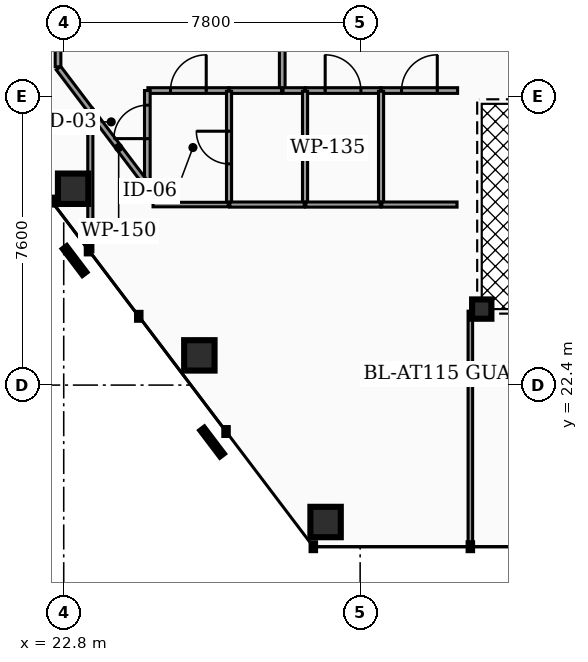
"""IFC4 building model, lengths in metres.
Left out: names, types, materials, properties, quantities, classifications, styles, units other than length and angle.
Written with IfcOpenShell. Run it as: python <this file> out.ifc"""

import sys

from ifc_helpers import new_model, si_unit, direction, frame, frame_2d, origin, origin_2d, place, context, subcontext, project, spatial, rectangle, hollow_rectangle, hollow_circle, extrude, element, fill, save


model = new_model("IFC4")
c1 = context("Model", 3, precision=1e-05, world=origin(), true_north=direction((0.0, 1.0)))
c2 = subcontext(c1, "Body", "Model", "MODEL_VIEW")
j1 = project(units=[si_unit("LENGTHUNIT", "METRE"), si_unit("PLANEANGLEUNIT", "RADIAN")], contexts=[c1])
p1 = place(None, origin())
s1 = spatial("IfcSite", under=j1, at=p1, CompositionType="ELEMENT")
p2 = place(p1, origin())
s2 = spatial("IfcBuilding", under=s1, at=p2, CompositionType="ELEMENT")
p3 = place(p2, frame((0.0, 0.0, 119.0)))
s3 = spatial("IfcBuildingStorey", under=s2, at=p3, CompositionType="ELEMENT", Elevation=119.0)
p4 = place(p3, frame((23.048, 27.566, 0.0), z_axis=(0.017338888501, 0.02545372184, 0.999525622978), x_axis=(-0.826467889679, 0.56298386063, 0.0)))
e1 = element("IfcColumn", 1, at=p4, inside=s3, PredefinedType="COLUMN", context=c2, shape_type="SweptSolid", body=[
    extrude(hollow_rectangle(XDim=0.8, YDim=0.8, WallThickness=0.04, at=origin_2d()), origin(), (0.0, 0.0, 1.0), 4.182),
])
p5 = place(p3, frame((26.369, 23.182, 0.0), z_axis=(0.03432339393, 0.003035402184, 0.999406169164), x_axis=(-0.088091571088, 0.99611238076, 0.0)))
e2 = element("IfcColumn", 2, at=p5, inside=s3, PredefinedType="COLUMN", context=c2, shape_type="SweptSolid", body=[
    extrude(hollow_rectangle(XDim=0.8, YDim=0.8, WallThickness=0.04, at=origin_2d()), origin(), (0.0, 0.0, 1.0), 4.182),
])
p6 = place(p3, frame((29.691, 18.797, 0.0), z_axis=(0.051205208625, -0.01930401373, 0.998501568183), x_axis=(0.352758005187, 0.935714587776, 0.0)))
e3 = element("IfcColumn", 3, at=p6, inside=s3, PredefinedType="COLUMN", context=c2, shape_type="SweptSolid", body=[
    extrude(hollow_rectangle(XDim=0.8, YDim=0.8, WallThickness=0.04, at=origin_2d()), origin(), (0.0, 0.0, 1.0), 4.186),
])
p7 = place(p3, frame((33.8, 24.4, 0.0), z_axis=(0.0, 0.0, 1.0), x_axis=(1.0, 0.0, 0.0)))
e4 = element("IfcColumn", 4, at=p7, inside=s3, PredefinedType="COLUMN", context=c2, shape_type="SweptSolid", body=[
    extrude(hollow_circle(Radius=0.254, WallThickness=0.02, at=origin_2d()), origin(), (0.0, 0.0, 1.0), 4.18),
])
p8 = place(p3, frame((28.55, 30.17, 0.0), z_axis=(0.0, 0.0, 1.0), x_axis=(0.0, 1.0, 0.0)))
e5 = element("IfcWall", 5, at=p8, inside=s3, PredefinedType="PARTITIONING", context=c2, shape_type="SweptSolid", body=[
    extrude(rectangle(XDim=3.065, YDim=0.15, at=frame_2d((1.533, 0.0))), origin(), (0.0, 0.0, 1.0), 3.137),
])
p9 = place(p8, frame((1.062, 0.0, 0.0)))
e6 = element("IfcOpeningElement", 6, at=p9, cuts=e5, PredefinedType="OPENING", context=c2, shape_type="SweptSolid", body=[
    extrude(rectangle(XDim=0.94, YDim=2.05, at=frame_2d((0.47, 1.025))), frame((0.0, 0.085, 0.0), z_axis=(0.0, -1.0, 0.0), x_axis=(1.0, 0.0, 0.0)), (0.0, 0.0, 1.0), 0.17),
])
p10 = place(p3, frame((28.57, 30.15, 0.0), z_axis=(0.0, 0.0, 1.0), x_axis=(1.0, 0.0, 0.0)))
e7 = element("IfcWall", 7, at=p10, inside=s3, PredefinedType="PARTITIONING", context=c2, shape_type="SweptSolid", body=[
    extrude(rectangle(XDim=0.575, YDim=0.15, at=frame_2d((0.288, 0.0))), origin(), (0.0, 0.0, 1.0), 3.137),
])
p11 = place(p3, frame((29.155, 30.15, 0.0), z_axis=(0.0, 0.0, 1.0), x_axis=(1.0, 0.0, 0.0)))
e8 = element("IfcWall", 8, at=p11, inside=s3, PredefinedType="PARTITIONING", context=c2, shape_type="SweptSolid", body=[
    extrude(rectangle(XDim=1.99, YDim=0.15, at=frame_2d((0.995, 0.0))), origin(), (0.0, 0.0, 1.0), 3.137),
])
p12 = place(p11, frame((0.525, 0.0, 0.0)))
e9 = element("IfcOpeningElement", 9, at=p12, cuts=e8, PredefinedType="OPENING", context=c2, shape_type="SweptSolid", body=[
    extrude(rectangle(XDim=0.94, YDim=2.05, at=frame_2d((0.47, 1.025))), frame((0.0, 0.085, 0.0), z_axis=(0.0, -1.0, 0.0), x_axis=(1.0, 0.0, 0.0)), (0.0, 0.0, 1.0), 0.17),
])
p13 = place(p3, frame((31.155, 30.15, 0.0), z_axis=(0.0, 0.0, 1.0), x_axis=(1.0, 0.0, 0.0)))
e10 = element("IfcWall", 10, at=p13, inside=s3, PredefinedType="PARTITIONING", context=c2, shape_type="SweptSolid", body=[
    extrude(rectangle(XDim=2.01, YDim=0.15, at=frame_2d((1.005, 0.0))), origin(), (0.0, 0.0, 1.0), 3.137),
])
p14 = place(p13, frame((0.535, 0.0, 0.0)))
e11 = element("IfcOpeningElement", 11, at=p14, cuts=e10, PredefinedType="OPENING", context=c2, shape_type="SweptSolid", body=[
    extrude(rectangle(XDim=0.94, YDim=2.05, at=frame_2d((0.47, 1.025))), frame((0.0, 0.085, 0.0), z_axis=(0.0, -1.0, 0.0), x_axis=(1.0, 0.0, 0.0)), (0.0, 0.0, 1.0), 0.17),
])
p15 = place(p3, frame((25.015, 30.15, 0.0), z_axis=(0.0, 0.0, 1.0), x_axis=(1.0, 0.0, 0.0)))
e12 = element("IfcWall", 12, at=p15, inside=s3, PredefinedType="PARTITIONING", context=c2, shape_type="SweptSolid", body=[
    extrude(rectangle(XDim=2.13, YDim=0.15, at=frame_2d((1.065, 0.0))), origin(), (0.0, 0.0, 1.0), 3.137),
])
p16 = place(p15, frame((0.595, 0.0, 0.0)))
e13 = element("IfcOpeningElement", 13, at=p16, cuts=e12, PredefinedType="OPENING", context=c2, shape_type="SweptSolid", body=[
    extrude(rectangle(XDim=0.94, YDim=2.05, at=frame_2d((0.47, 1.025))), frame((0.0, 0.085, 0.0), z_axis=(0.0, -1.0, 0.0), x_axis=(1.0, 0.0, 0.0)), (0.0, 0.0, 1.0), 0.17),
])
p17 = place(p3, frame((27.155, 30.15, 0.0), z_axis=(0.0, 0.0, 1.0), x_axis=(1.0, 0.0, 0.0)))
e14 = element("IfcWall", 14, at=p17, inside=s3, PredefinedType="PARTITIONING", context=c2, shape_type="SweptSolid", body=[
    extrude(rectangle(XDim=1.375, YDim=0.15, at=frame_2d((0.688, 0.0))), origin(), (0.0, 0.0, 1.0), 3.137),
])
p18 = place(p3, frame((25.0, 27.675, 0.0), z_axis=(0.0, 0.0, 1.0), x_axis=(0.0, 1.0, 0.0)))
e15 = element("IfcWall", 15, at=p18, inside=s3, PredefinedType="PARTITIONING", context=c2, shape_type="SweptSolid", body=[
    extrude(rectangle(XDim=2.475, YDim=0.15, at=frame_2d((1.237, 0.0))), origin(), (0.0, 0.0, 1.0), 3.137),
])
p19 = place(p18, frame((1.21, 0.0, 0.0)))
e16 = element("IfcOpeningElement", 16, at=p19, cuts=e15, PredefinedType="OPENING", context=c2, shape_type="SweptSolid", body=[
    extrude(rectangle(XDim=0.88, YDim=2.05, at=frame_2d((0.44, 1.025))), frame((0.0, 0.085, 0.0), z_axis=(0.0, -1.0, 0.0), x_axis=(1.0, 0.0, 0.0)), (0.0, 0.0, 1.0), 0.17),
])
p20 = place(p3, frame((23.503, 29.631, 0.0), z_axis=(0.0, 0.0, 1.0), x_axis=(0.603758281428, -0.797167446404, 0.0)))
e17 = element("IfcWall", 17, at=p20, inside=s3, PredefinedType="PARTITIONING", context=c2, shape_type="SweptSolid", body=[
    extrude(rectangle(XDim=2.459, YDim=0.15, at=frame_2d((1.229, 0.0))), origin(), (0.0, 0.0, 1.0), 3.137),
])
p21 = place(p3, frame((22.662, 30.741, 0.0), z_axis=(0.0, 0.0, 1.0), x_axis=(0.603780052094, -0.79715095728, 0.0)))
e18 = element("IfcWall", 18, at=p21, inside=s3, PredefinedType="PARTITIONING", context=c2, shape_type="SweptSolid", body=[
    extrude(rectangle(XDim=1.393, YDim=0.15, at=frame_2d((0.696, 0.0))), origin(), (0.0, 0.0, 1.0), 3.137),
])
p22 = place(p3, frame((22.65, 30.777, 0.0), z_axis=(0.0, 0.0, 1.0), x_axis=(0.0, 1.0, 0.0)))
e19 = element("IfcWall", 19, at=p22, inside=s3, PredefinedType="PARTITIONING", context=c2, shape_type="SweptSolid", body=[
    extrude(rectangle(XDim=2.473, YDim=0.15, at=frame_2d((1.236, 0.0))), origin(), (0.0, 0.0, 1.0), 3.137),
])
p23 = place(p3, frame((27.15, 27.17, 0.0), z_axis=(0.0, 0.0, 1.0), x_axis=(0.0, 1.0, 0.0)))
e20 = element("IfcWall", 20, at=p23, inside=s3, PredefinedType="PARTITIONING", context=c2, shape_type="SweptSolid", body=[
    extrude(rectangle(XDim=2.96, YDim=0.135, at=frame_2d((1.48, 0.0))), origin(), (0.0, 0.0, 1.0), 3.137),
])
p24 = place(p23, frame((1.05, 0.0, 0.0)))
e21 = element("IfcOpeningElement", 21, at=p24, cuts=e20, PredefinedType="OPENING", context=c2, shape_type="SweptSolid", body=[
    extrude(rectangle(XDim=0.86, YDim=2.05, at=frame_2d((0.43, 1.025))), frame((0.0, 0.077, 0.0), z_axis=(0.0, -1.0, 0.0), x_axis=(1.0, 0.0, 0.0)), (0.0, 0.0, 1.0), 0.155),
])
p25 = place(p3, frame((25.15, 27.15, 0.0), z_axis=(0.0, 0.0, 1.0), x_axis=(1.0, 0.0, 0.0)))
e22 = element("IfcWall", 22, at=p25, inside=s3, PredefinedType="PARTITIONING", context=c2, shape_type="SweptSolid", body=[
    extrude(rectangle(XDim=1.98, YDim=0.12, at=frame_2d((0.99, 0.0))), origin(), (0.0, 0.0, 1.0), 3.137),
])
p26 = place(p3, frame((29.15, 27.17, 0.0), z_axis=(0.0, 0.0, 1.0), x_axis=(0.0, 1.0, 0.0)))
e23 = element("IfcWall", 23, at=p26, inside=s3, PredefinedType="PARTITIONING", context=c2, shape_type="SweptSolid", body=[
    extrude(rectangle(XDim=2.96, YDim=0.135, at=frame_2d((1.48, 0.0))), origin(), (0.0, 0.0, 1.0), 3.137),
])
p27 = place(p3, frame((27.17, 27.15, 0.0), z_axis=(0.0, 0.0, 1.0), x_axis=(1.0, 0.0, 0.0)))
e24 = element("IfcWall", 24, at=p27, inside=s3, PredefinedType="PARTITIONING", context=c2, shape_type="SweptSolid", body=[
    extrude(rectangle(XDim=1.96, YDim=0.135, at=frame_2d((0.98, 0.0))), origin(), (0.0, 0.0, 1.0), 3.137),
])
p28 = place(p3, frame((31.15, 27.17, 0.0), z_axis=(0.0, 0.0, 1.0), x_axis=(0.0, 1.0, 0.0)))
e25 = element("IfcWall", 25, at=p28, inside=s3, PredefinedType="PARTITIONING", context=c2, shape_type="SweptSolid", body=[
    extrude(rectangle(XDim=2.96, YDim=0.135, at=frame_2d((1.48, 0.0))), origin(), (0.0, 0.0, 1.0), 3.137),
])
p29 = place(p3, frame((29.17, 27.15, 0.0), z_axis=(0.0, 0.0, 1.0), x_axis=(1.0, 0.0, 0.0)))
e26 = element("IfcWall", 26, at=p29, inside=s3, PredefinedType="PARTITIONING", context=c2, shape_type="SweptSolid", body=[
    extrude(rectangle(XDim=1.96, YDim=0.135, at=frame_2d((0.98, 0.0))), origin(), (0.0, 0.0, 1.0), 3.137),
])
p30 = place(p3, frame((31.17, 27.15, 0.0), z_axis=(0.0, 0.0, 1.0), x_axis=(1.0, 0.0, 0.0)))
e27 = element("IfcWall", 27, at=p30, inside=s3, PredefinedType="PARTITIONING", context=c2, shape_type="SweptSolid", body=[
    extrude(rectangle(XDim=1.98, YDim=0.135, at=frame_2d((0.99, 0.0))), origin(), (0.0, 0.0, 1.0), 3.137),
])
p31 = place(p3, frame((33.5, 18.162, 0.0), z_axis=(0.0, 0.0, 1.0), x_axis=(0.0, 1.0, 0.0)))
e28 = element("IfcWall", 28, at=p31, inside=s3, PredefinedType="PARTITIONING", context=c2, shape_type="SweptSolid", body=[
    extrude(rectangle(XDim=6.183, YDim=0.12, at=frame_2d((3.091, 0.0))), origin(), (0.0, 0.0, 1.0), 3.137),
])
p32 = place(p3, frame((23.5, 25.907, 0.0), z_axis=(0.0, 0.0, 1.0), x_axis=(0.0, 1.0, 0.0)))
e29 = element("IfcWall", 29, at=p32, inside=s3, PredefinedType="PARTITIONING", context=c2, shape_type="SweptSolid", body=[
    extrude(rectangle(XDim=3.708, YDim=0.135, at=frame_2d((1.854, 0.0))), origin(), (0.0, 0.0, 1.0), 3.137),
])
p33 = place(p12, origin())
e30 = element("IfcDoor", 30, at=p33, inside=s3, OperationType="SINGLE_SWING_LEFT", PredefinedType="DOOR", context=c2, shape_type="SweptSolid", body=[
    extrude(rectangle(XDim=0.94, YDim=2.05, at=frame_2d((0.47, 1.025))), frame((0.0, 0.025, 0.0), z_axis=(0.0, -1.0, 0.0), x_axis=(1.0, 0.0, 0.0)), (0.0, 0.0, 1.0), 0.05),
])
fill(e9, e30)
p34 = place(p14, origin())
e31 = element("IfcDoor", 31, at=p34, inside=s3, OperationType="SINGLE_SWING_RIGHT", PredefinedType="DOOR", context=c2, shape_type="SweptSolid", body=[
    extrude(rectangle(XDim=0.94, YDim=2.05, at=frame_2d((0.47, 1.025))), frame((0.0, 0.025, 0.0), z_axis=(0.0, -1.0, 0.0), x_axis=(1.0, 0.0, 0.0)), (0.0, 0.0, 1.0), 0.05),
])
fill(e11, e31)
p35 = place(p16, origin())
e32 = element("IfcDoor", 32, at=p35, inside=s3, OperationType="SINGLE_SWING_RIGHT", PredefinedType="DOOR", context=c2, shape_type="SweptSolid", body=[
    extrude(rectangle(XDim=0.94, YDim=2.05, at=frame_2d((0.47, 1.025))), frame((0.0, 0.025, 0.0), z_axis=(0.0, -1.0, 0.0), x_axis=(1.0, 0.0, 0.0)), (0.0, 0.0, 1.0), 0.05),
])
fill(e13, e32)
p36 = place(p19, origin())
e33 = element("IfcDoor", 33, at=p36, inside=s3, OperationType="SINGLE_SWING_LEFT", PredefinedType="DOOR", context=c2, shape_type="SweptSolid", body=[
    extrude(rectangle(XDim=0.88, YDim=2.05, at=frame_2d((0.44, 1.025))), frame((0.0, 0.025, 0.0), z_axis=(0.0, -1.0, 0.0), x_axis=(1.0, 0.0, 0.0)), (0.0, 0.0, 1.0), 0.05),
])
fill(e16, e33)
p37 = place(p24, origin())
e34 = element("IfcDoor", 34, at=p37, inside=s3, OperationType="SINGLE_SWING_RIGHT", PredefinedType="DOOR", context=c2, shape_type="SweptSolid", body=[
    extrude(rectangle(XDim=0.86, YDim=2.05, at=frame_2d((0.43, 1.025))), frame((0.0, 0.025, 0.0), z_axis=(0.0, -1.0, 0.0), x_axis=(1.0, 0.0, 0.0)), (0.0, 0.0, 1.0), 0.05),
])
fill(e21, e34)
save(model, sys.argv[1])
